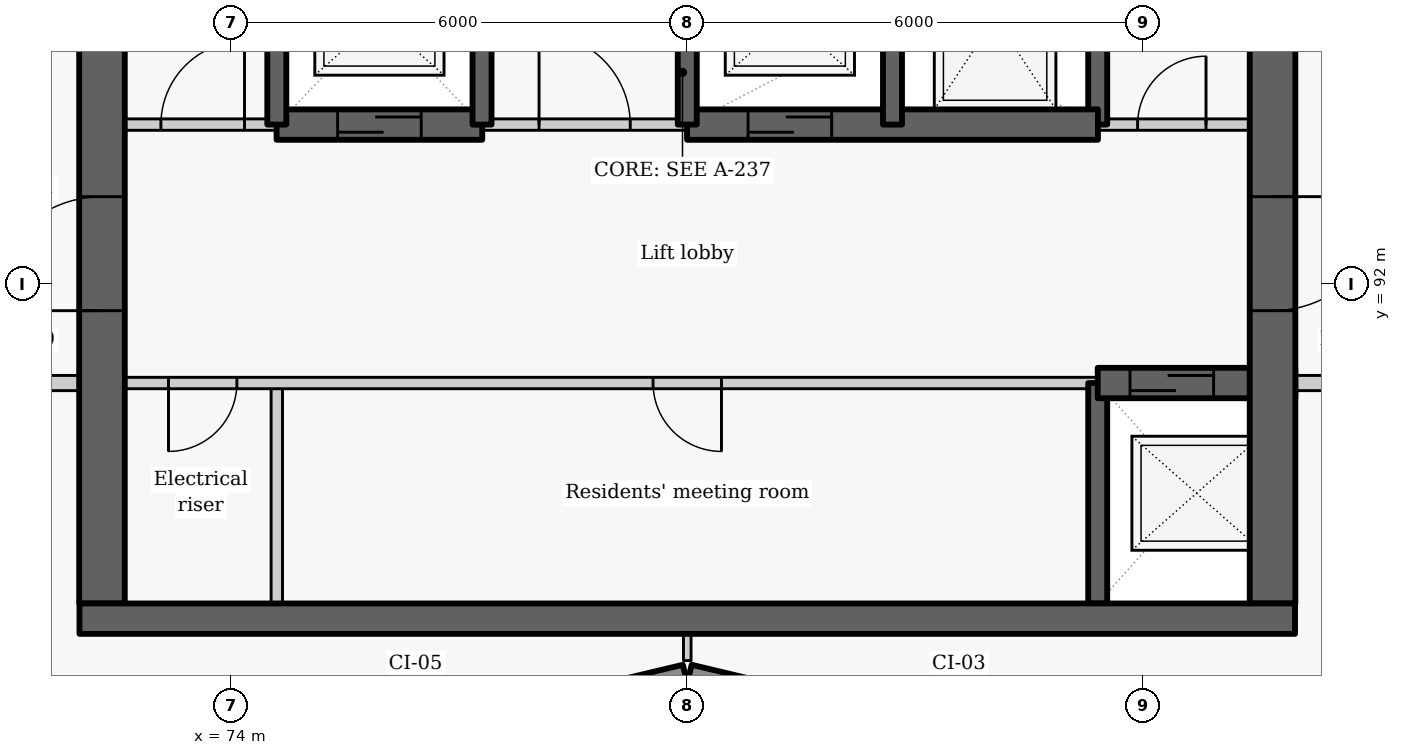
"""IFC4 building model, lengths in metres.
Left out: names, types, materials, properties, quantities, classifications, styles, units other than length and angle.
Written with IfcOpenShell. Run it as: python <this file> out.ifc"""

import sys

from ifc_helpers import new_model, si_unit, direction, frame, frame_2d, origin, place, context, subcontext, project, spatial, rectangle, extrude, element, fill, save


model = new_model("IFC4")
c1 = context("Model", 3, precision=1e-05, world=origin(), true_north=direction((0.0, 1.0)))
c2 = subcontext(c1, "Body", "Model", "MODEL_VIEW")
j1 = project(units=[si_unit("LENGTHUNIT", "METRE"), si_unit("PLANEANGLEUNIT", "RADIAN")], contexts=[c1])
p1 = place(None, origin())
s1 = spatial("IfcSite", under=j1, at=p1, CompositionType="ELEMENT")
p2 = place(p1, origin())
s2 = spatial("IfcBuilding", under=s1, at=p2, CompositionType="ELEMENT")
p3 = place(p2, frame((0.0, 0.0, 216.3)))
s3 = spatial("IfcBuildingStorey", under=s2, at=p3, CompositionType="ELEMENT", Elevation=216.3)
p4 = place(p3, frame((76.814, 86.119, 0.0), z_axis=(0.0, 0.0, 1.0), x_axis=(0.972773113459, 0.231759508395, 0.0)))
e1 = element("IfcWall", 1, at=p4, inside=s3, PredefinedType="SOLIDWALL", context=c2, shape_type="SweptSolid", body=[
    extrude(rectangle(XDim=3.246, YDim=0.25, at=frame_2d((1.623, 0.0))), origin(), (0.0, 0.0, 1.0), 2.05),
])
p5 = place(p4, frame((0.573, 0.0, 0.9)))
e2 = element("IfcOpeningElement", 2, at=p5, cuts=e1, PredefinedType="OPENING", context=c2, shape_type="SweptSolid", body=[
    extrude(rectangle(XDim=2.1, YDim=1.1, at=frame_2d((1.05, 0.55))), frame((0.0, 0.135, 0.0), z_axis=(0.0, -1.0, 0.0), x_axis=(1.0, 0.0, 0.0)), (0.0, 0.0, 1.0), 0.27),
])
p6 = place(p3, frame((80.029, 86.872, 0.0), z_axis=(0.0, 0.0, 1.0), x_axis=(0.972773113459, -0.231759508395, 0.0)))
e3 = element("IfcWall", 3, at=p6, inside=s3, PredefinedType="SOLIDWALL", context=c2, shape_type="SweptSolid", body=[
    extrude(rectangle(XDim=3.246, YDim=0.25, at=frame_2d((1.623, 0.0))), origin(), (0.0, 0.0, 1.0), 2.05),
])
p7 = place(p6, frame((0.573, 0.0, 0.9)))
e4 = element("IfcOpeningElement", 4, at=p7, cuts=e3, PredefinedType="OPENING", context=c2, shape_type="SweptSolid", body=[
    extrude(rectangle(XDim=2.1, YDim=1.1, at=frame_2d((1.05, 0.55))), frame((0.0, 0.135, 0.0), z_axis=(0.0, -1.0, 0.0), x_axis=(1.0, 0.0, 0.0)), (0.0, 0.0, 1.0), 0.27),
])
p8 = place(p3, frame((74.6, 87.8, 0.0), z_axis=(0.0, 0.0, 1.0), x_axis=(0.0, 1.0, 0.0)))
e5 = element("IfcWall", 5, at=p8, inside=s3, PredefinedType="PARTITIONING", context=c2, shape_type="SweptSolid", body=[
    extrude(rectangle(XDim=2.9, YDim=0.15, at=frame_2d((1.45, 0.0))), origin(), (0.0, 0.0, 1.0), 2.95),
])
p9 = place(p3, frame((85.4, 90.7, 0.0), z_axis=(0.0, 0.0, 1.0), x_axis=(-1.0, 0.0, 0.0)))
e6 = element("IfcWall", 6, at=p9, inside=s3, PredefinedType="PARTITIONING", context=c2, shape_type="SweptSolid", body=[
    extrude(rectangle(XDim=13.4, YDim=0.15, at=frame_2d((6.7, 0.0))), origin(), (0.0, 0.0, 1.0), 2.95),
])
p10 = place(p9, frame((11.325, 0.0, 0.0)))
e7 = element("IfcOpeningElement", 7, at=p10, cuts=e6, PredefinedType="OPENING", context=c2, shape_type="SweptSolid", body=[
    extrude(rectangle(XDim=0.9, YDim=2.1, at=frame_2d((0.45, 1.05))), frame((0.0, 0.085, 0.0), z_axis=(0.0, -1.0, 0.0), x_axis=(1.0, 0.0, 0.0)), (0.0, 0.0, 1.0), 0.17),
])
p11 = place(p9, frame((4.95, 0.0, 0.0)))
e8 = element("IfcOpeningElement", 8, at=p11, cuts=e6, PredefinedType="OPENING", context=c2, shape_type="SweptSolid", body=[
    extrude(rectangle(XDim=0.9, YDim=2.1, at=frame_2d((0.45, 1.05))), frame((0.0, 0.085, 0.0), z_axis=(0.0, -1.0, 0.0), x_axis=(1.0, 0.0, 0.0)), (0.0, 0.0, 1.0), 0.17),
])
p12 = place(p3, frame((72.3, 87.8, -0.275), z_axis=(0.0, 0.0, 1.0), x_axis=(0.0, 1.0, 0.0)))
e9 = element("IfcWall", 9, at=p12, inside=s3, PredefinedType="SHEAR", context=c2, shape_type="SweptSolid", body=[
    extrude(rectangle(XDim=9.1, YDim=0.6, at=frame_2d((4.55, 0.0))), origin(), (0.0, 0.0, 1.0), 3.225),
])
p13 = place(p12, frame((3.852, 0.0, 0.275)))
e10 = element("IfcOpeningElement", 10, at=p13, cuts=e9, PredefinedType="OPENING", context=c2, shape_type="SweptSolid", body=[
    extrude(rectangle(XDim=1.5, YDim=2.1, at=frame_2d((0.75, 1.05))), frame((0.0, 0.31, 0.0), z_axis=(0.0, -1.0, 0.0), x_axis=(1.0, 0.0, 0.0)), (0.0, 0.0, 1.0), 0.62),
])
p14 = place(p3, frame((85.4, 87.8, -0.275), z_axis=(0.0, 0.0, 1.0), x_axis=(0.0, 1.0, 0.0)))
e11 = element("IfcWall", 11, at=p14, inside=s3, PredefinedType="SHEAR", context=c2, shape_type="SweptSolid", body=[
    extrude(rectangle(XDim=2.9, YDim=0.25, at=frame_2d((1.45, 0.0))), origin(), (0.0, 0.0, 1.0), 3.225),
])
p15 = place(p3, frame((85.4, 94.1, -0.275), z_axis=(0.0, 0.0, 1.0), x_axis=(0.0, 1.0, 0.0)))
e12 = element("IfcWall", 12, at=p15, inside=s3, PredefinedType="SHEAR", context=c2, shape_type="SweptSolid", body=[
    extrude(rectangle(XDim=2.8, YDim=0.25, at=frame_2d((1.4, 0.0))), origin(), (0.0, 0.0, 1.0), 3.225),
])
p16 = place(p3, frame((85.4, 90.7, -0.275), z_axis=(0.0, 0.0, 1.0), x_axis=(1.0, 0.0, 0.0)))
e13 = element("IfcWall", 13, at=p16, inside=s3, PredefinedType="SHEAR", context=c2, shape_type="SweptSolid", body=[
    extrude(rectangle(XDim=2.6, YDim=0.4, at=frame_2d((1.3, 0.0))), origin(), (0.0, 0.0, 1.0), 3.225),
])
p17 = place(p16, frame((0.425, 0.0, 0.275)))
e14 = element("IfcOpeningElement", 14, at=p17, cuts=e13, PredefinedType="OPENING", context=c2, shape_type="SweptSolid", body=[
    extrude(rectangle(XDim=1.1, YDim=2.1, at=frame_2d((0.55, 1.05))), frame((0.0, 0.21, 0.0), z_axis=(0.0, -1.0, 0.0), x_axis=(1.0, 0.0, 0.0)), (0.0, 0.0, 1.0), 0.42),
])
p18 = place(p3, frame((87.7, 102.05, -0.275), z_axis=(0.0, 0.0, 1.0), x_axis=(0.0, -1.0, 0.0)))
e15 = element("IfcWall", 15, at=p18, inside=s3, PredefinedType="SHEAR", context=c2, shape_type="SweptSolid", body=[
    extrude(rectangle(XDim=14.25, YDim=0.6, at=frame_2d((7.125, 0.0))), origin(), (0.0, 0.0, 1.0), 3.225),
])
p19 = place(p18, frame((8.898, 0.0, 0.275)))
e16 = element("IfcOpeningElement", 16, at=p19, cuts=e15, PredefinedType="OPENING", context=c2, shape_type="SweptSolid", body=[
    extrude(rectangle(XDim=1.5, YDim=2.1, at=frame_2d((0.75, 1.05))), frame((0.0, 0.31, 0.0), z_axis=(0.0, -1.0, 0.0), x_axis=(1.0, 0.0, 0.0)), (0.0, 0.0, 1.0), 0.62),
])
p20 = place(p3, frame((72.0, 94.1, 0.0), z_axis=(0.0, 0.0, 1.0), x_axis=(1.0, 0.0, 0.0)))
e17 = element("IfcWall", 17, at=p20, inside=s3, PredefinedType="PARTITIONING", context=c2, shape_type="SweptSolid", body=[
    extrude(rectangle(XDim=2.603, YDim=0.15, at=frame_2d((1.302, 0.0))), origin(), (0.0, 0.0, 1.0), 2.95),
])
p21 = place(p20, frame((1.075, 0.0, 0.0)))
e18 = element("IfcOpeningElement", 18, at=p21, cuts=e17, PredefinedType="OPENING", context=c2, shape_type="SweptSolid", body=[
    extrude(rectangle(XDim=1.1, YDim=2.1, at=frame_2d((0.55, 1.05))), frame((0.0, 0.085, 0.0), z_axis=(0.0, -1.0, 0.0), x_axis=(1.0, 0.0, 0.0)), (0.0, 0.0, 1.0), 0.17),
])
p22 = place(p3, frame((77.297, 94.1, 0.0), z_axis=(0.0, 0.0, 1.0), x_axis=(1.0, 0.0, 0.0)))
e19 = element("IfcWall", 19, at=p22, inside=s3, PredefinedType="PARTITIONING", context=c2, shape_type="SweptSolid", body=[
    extrude(rectangle(XDim=2.706, YDim=0.15, at=frame_2d((1.353, 0.0))), origin(), (0.0, 0.0, 1.0), 2.95),
])
p23 = place(p22, frame((0.753, 0.0, 0.0)))
e20 = element("IfcOpeningElement", 20, at=p23, cuts=e19, PredefinedType="OPENING", context=c2, shape_type="SweptSolid", body=[
    extrude(rectangle(XDim=1.2, YDim=2.1, at=frame_2d((0.6, 1.05))), frame((0.0, 0.085, 0.0), z_axis=(0.0, -1.0, 0.0), x_axis=(1.0, 0.0, 0.0)), (0.0, 0.0, 1.0), 0.17),
])
p24 = place(p3, frame((85.397, 94.1, 0.0), z_axis=(0.0, 0.0, 1.0), x_axis=(1.0, 0.0, 0.0)))
e21 = element("IfcWall", 21, at=p24, inside=s3, PredefinedType="PARTITIONING", context=c2, shape_type="SweptSolid", body=[
    extrude(rectangle(XDim=2.603, YDim=0.15, at=frame_2d((1.302, 0.0))), origin(), (0.0, 0.0, 1.0), 2.95),
])
p25 = place(p24, frame((0.528, 0.0, 0.0)))
e22 = element("IfcOpeningElement", 22, at=p25, cuts=e21, PredefinedType="OPENING", context=c2, shape_type="SweptSolid", body=[
    extrude(rectangle(XDim=0.9, YDim=2.1, at=frame_2d((0.45, 1.05))), frame((0.0, 0.085, 0.0), z_axis=(0.0, -1.0, 0.0), x_axis=(1.0, 0.0, 0.0)), (0.0, 0.0, 1.0), 0.17),
])
p26 = place(p3, frame((74.597, 94.1, -0.275), z_axis=(0.0, 0.0, 1.0), x_axis=(1.0, 0.0, 0.0)))
e23 = element("IfcWall", 23, at=p26, inside=s3, PredefinedType="SHEAR", context=c2, shape_type="SweptSolid", body=[
    extrude(rectangle(XDim=2.706, YDim=0.4, at=frame_2d((1.353, 0.0))), origin(), (0.0, 0.0, 1.0), 3.225),
])
p27 = place(p26, frame((0.803, 0.0, 0.275)))
e24 = element("IfcOpeningElement", 24, at=p27, cuts=e23, PredefinedType="OPENING", context=c2, shape_type="SweptSolid", body=[
    extrude(rectangle(XDim=1.1, YDim=2.1, at=frame_2d((0.55, 1.05))), frame((0.0, 0.21, 0.0), z_axis=(0.0, -1.0, 0.0), x_axis=(1.0, 0.0, 0.0)), (0.0, 0.0, 1.0), 0.42),
])
p28 = place(p3, frame((79.997, 94.1, -0.275), z_axis=(0.0, 0.0, 1.0), x_axis=(1.0, 0.0, 0.0)))
e25 = element("IfcWall", 25, at=p28, inside=s3, PredefinedType="SHEAR", context=c2, shape_type="SweptSolid", body=[
    extrude(rectangle(XDim=5.406, YDim=0.4, at=frame_2d((2.703, 0.0))), origin(), (0.0, 0.0, 1.0), 3.225),
])
p29 = place(p28, frame((0.803, 0.0, 0.275)))
e26 = element("IfcOpeningElement", 26, at=p29, cuts=e25, PredefinedType="OPENING", context=c2, shape_type="SweptSolid", body=[
    extrude(rectangle(XDim=1.1, YDim=2.1, at=frame_2d((0.55, 1.05))), frame((0.0, 0.21, 0.0), z_axis=(0.0, -1.0, 0.0), x_axis=(1.0, 0.0, 0.0)), (0.0, 0.0, 1.0), 0.42),
])
for number, where, z_axis, x_axis in (
    (27, (74.6, 94.1, -0.275), (0.0, 0.0, 1.0), (0.0, 1.0, 0.0)),
    (28, (77.3, 94.1, -0.275), (0.0, 0.0, 1.0), (0.0, 1.0, 0.0)),
    (29, (80.0, 94.1, -0.275), (0.0, 0.0, 1.0), (0.0, 1.0, 0.0)),
    (30, (82.7, 94.1, -0.275), (0.0, 0.0, 1.0), (0.0, 1.0, 0.0)),
):
    element("IfcWall", number, at=place(p3, frame(where, z_axis=z_axis, x_axis=x_axis)), inside=s3, PredefinedType="SHEAR", context=c2, shape_type="SweptSolid", body=[
        extrude(rectangle(XDim=2.8, YDim=0.25, at=frame_2d((1.4, 0.0))), origin(), (0.0, 0.0, 1.0), 3.225),
    ])
for number, where, z_axis, x_axis in (
    (31, (70.45, 90.7, 0.0), (0.0, 0.0, 1.0), (1.0, 0.0, 0.0)),
    (32, (88.0, 90.7, 0.0), (0.0, 0.0, 1.0), (1.0, 0.0, 0.0)),
):
    element("IfcWall", number, at=place(p3, frame(where, z_axis=z_axis, x_axis=x_axis)), inside=s3, PredefinedType="PARTITIONING", context=c2, shape_type="SweptSolid", body=[
        extrude(rectangle(XDim=1.55, YDim=0.2, at=frame_2d((0.775, 0.0))), origin(), (0.0, 0.0, 1.0), 2.95),
    ])
p30 = place(p3, frame((80.0, 87.048, 0.0), z_axis=(0.0, 0.0, 1.0), x_axis=(0.0, 1.0, 0.0)))
e33 = element("IfcWall", 33, at=p30, inside=s3, PredefinedType="PARTITIONING", context=c2, shape_type="SweptSolid", body=[
    extrude(rectangle(XDim=0.352, YDim=0.1, at=frame_2d((0.176, 0.0))), origin(), (0.0, 0.0, 1.0), 2.95),
])
p31 = place(p3, frame((72.004, 87.6, -0.275), z_axis=(0.0, 0.0, 1.0), x_axis=(1.0, 0.0, 0.0)))
e34 = element("IfcWall", 34, at=p31, inside=s3, PredefinedType="SHEAR", context=c2, shape_type="SweptSolid", body=[
    extrude(rectangle(XDim=15.992, YDim=0.4, at=frame_2d((7.996, 0.0))), origin(), (0.0, 0.0, 1.0), 3.225),
])
p32 = place(p10, origin())
e35 = element("IfcDoor", 35, at=p32, inside=s3, OperationType="SINGLE_SWING_RIGHT", PredefinedType="DOOR", context=c2, shape_type="SweptSolid", body=[
    extrude(rectangle(XDim=0.9, YDim=2.1, at=frame_2d((0.45, 1.05))), frame((0.0, 0.025, 0.0), z_axis=(0.0, -1.0, 0.0), x_axis=(1.0, 0.0, 0.0)), (0.0, 0.0, 1.0), 0.05),
])
fill(e7, e35)
p33 = place(p17, origin())
e36 = element("IfcDoor", 36, at=p33, inside=s3, OperationType="SLIDING_TO_LEFT", PredefinedType="DOOR", context=c2, shape_type="SweptSolid", body=[
    extrude(rectangle(XDim=1.1, YDim=2.1, at=frame_2d((0.55, 1.05))), frame((0.0, 0.025, 0.0), z_axis=(0.0, -1.0, 0.0), x_axis=(1.0, 0.0, 0.0)), (0.0, 0.0, 1.0), 0.05),
])
fill(e14, e36)
p34 = place(p11, origin())
e37 = element("IfcDoor", 37, at=p34, inside=s3, OperationType="SINGLE_SWING_LEFT", PredefinedType="DOOR", context=c2, shape_type="SweptSolid", body=[
    extrude(rectangle(XDim=0.9, YDim=2.1, at=frame_2d((0.45, 1.05))), frame((0.0, 0.025, 0.0), z_axis=(0.0, -1.0, 0.0), x_axis=(1.0, 0.0, 0.0)), (0.0, 0.0, 1.0), 0.05),
])
fill(e8, e37)
p35 = place(p21, origin())
e38 = element("IfcDoor", 38, at=p35, inside=s3, OperationType="SINGLE_SWING_RIGHT", PredefinedType="DOOR", context=c2, shape_type="SweptSolid", body=[
    extrude(rectangle(XDim=1.1, YDim=2.1, at=frame_2d((0.55, 1.05))), frame((0.0, 0.025, 0.0), z_axis=(0.0, -1.0, 0.0), x_axis=(1.0, 0.0, 0.0)), (0.0, 0.0, 1.0), 0.05),
])
fill(e18, e38)
p36 = place(p27, origin())
e39 = element("IfcDoor", 39, at=p36, inside=s3, OperationType="SLIDING_TO_LEFT", PredefinedType="DOOR", context=c2, shape_type="SweptSolid", body=[
    extrude(rectangle(XDim=1.1, YDim=2.1, at=frame_2d((0.55, 1.05))), frame((0.0, 0.025, 0.0), z_axis=(0.0, -1.0, 0.0), x_axis=(1.0, 0.0, 0.0)), (0.0, 0.0, 1.0), 0.05),
])
fill(e24, e39)
p37 = place(p23, origin())
e40 = element("IfcDoor", 40, at=p37, inside=s3, OperationType="DOUBLE_DOOR_SINGLE_SWING", PredefinedType="DOOR", context=c2, shape_type="SweptSolid", body=[
    extrude(rectangle(XDim=1.2, YDim=2.1, at=frame_2d((0.6, 1.05))), frame((0.0, 0.025, 0.0), z_axis=(0.0, -1.0, 0.0), x_axis=(1.0, 0.0, 0.0)), (0.0, 0.0, 1.0), 0.05),
])
fill(e20, e40)
p38 = place(p29, origin())
e41 = element("IfcDoor", 41, at=p38, inside=s3, OperationType="SLIDING_TO_LEFT", PredefinedType="DOOR", context=c2, shape_type="SweptSolid", body=[
    extrude(rectangle(XDim=1.1, YDim=2.1, at=frame_2d((0.55, 1.05))), frame((0.0, 0.025, 0.0), z_axis=(0.0, -1.0, 0.0), x_axis=(1.0, 0.0, 0.0)), (0.0, 0.0, 1.0), 0.05),
])
fill(e26, e41)
p39 = place(p25, origin())
e42 = element("IfcDoor", 42, at=p39, inside=s3, OperationType="SINGLE_SWING_RIGHT", PredefinedType="DOOR", context=c2, shape_type="SweptSolid", body=[
    extrude(rectangle(XDim=0.9, YDim=2.1, at=frame_2d((0.45, 1.05))), frame((0.0, 0.025, 0.0), z_axis=(0.0, -1.0, 0.0), x_axis=(1.0, 0.0, 0.0)), (0.0, 0.0, 1.0), 0.05),
])
fill(e22, e42)
p40 = place(p19, origin())
e43 = element("IfcDoor", 43, at=p40, inside=s3, OperationType="DOUBLE_DOOR_SINGLE_SWING", PredefinedType="DOOR", context=c2, shape_type="SweptSolid", body=[
    extrude(rectangle(XDim=1.5, YDim=2.1, at=frame_2d((0.75, 1.05))), frame((0.0, 0.025, 0.0), z_axis=(0.0, -1.0, 0.0), x_axis=(1.0, 0.0, 0.0)), (0.0, 0.0, 1.0), 0.05),
])
fill(e16, e43)
p41 = place(p13, origin())
e44 = element("IfcDoor", 44, at=p41, inside=s3, OperationType="DOUBLE_DOOR_SINGLE_SWING", PredefinedType="DOOR", context=c2, shape_type="SweptSolid", body=[
    extrude(rectangle(XDim=1.5, YDim=2.1, at=frame_2d((0.75, 1.05))), frame((0.0, 0.025, 0.0), z_axis=(0.0, -1.0, 0.0), x_axis=(1.0, 0.0, 0.0)), (0.0, 0.0, 1.0), 0.05),
])
fill(e10, e44)
save(model, sys.argv[1])
